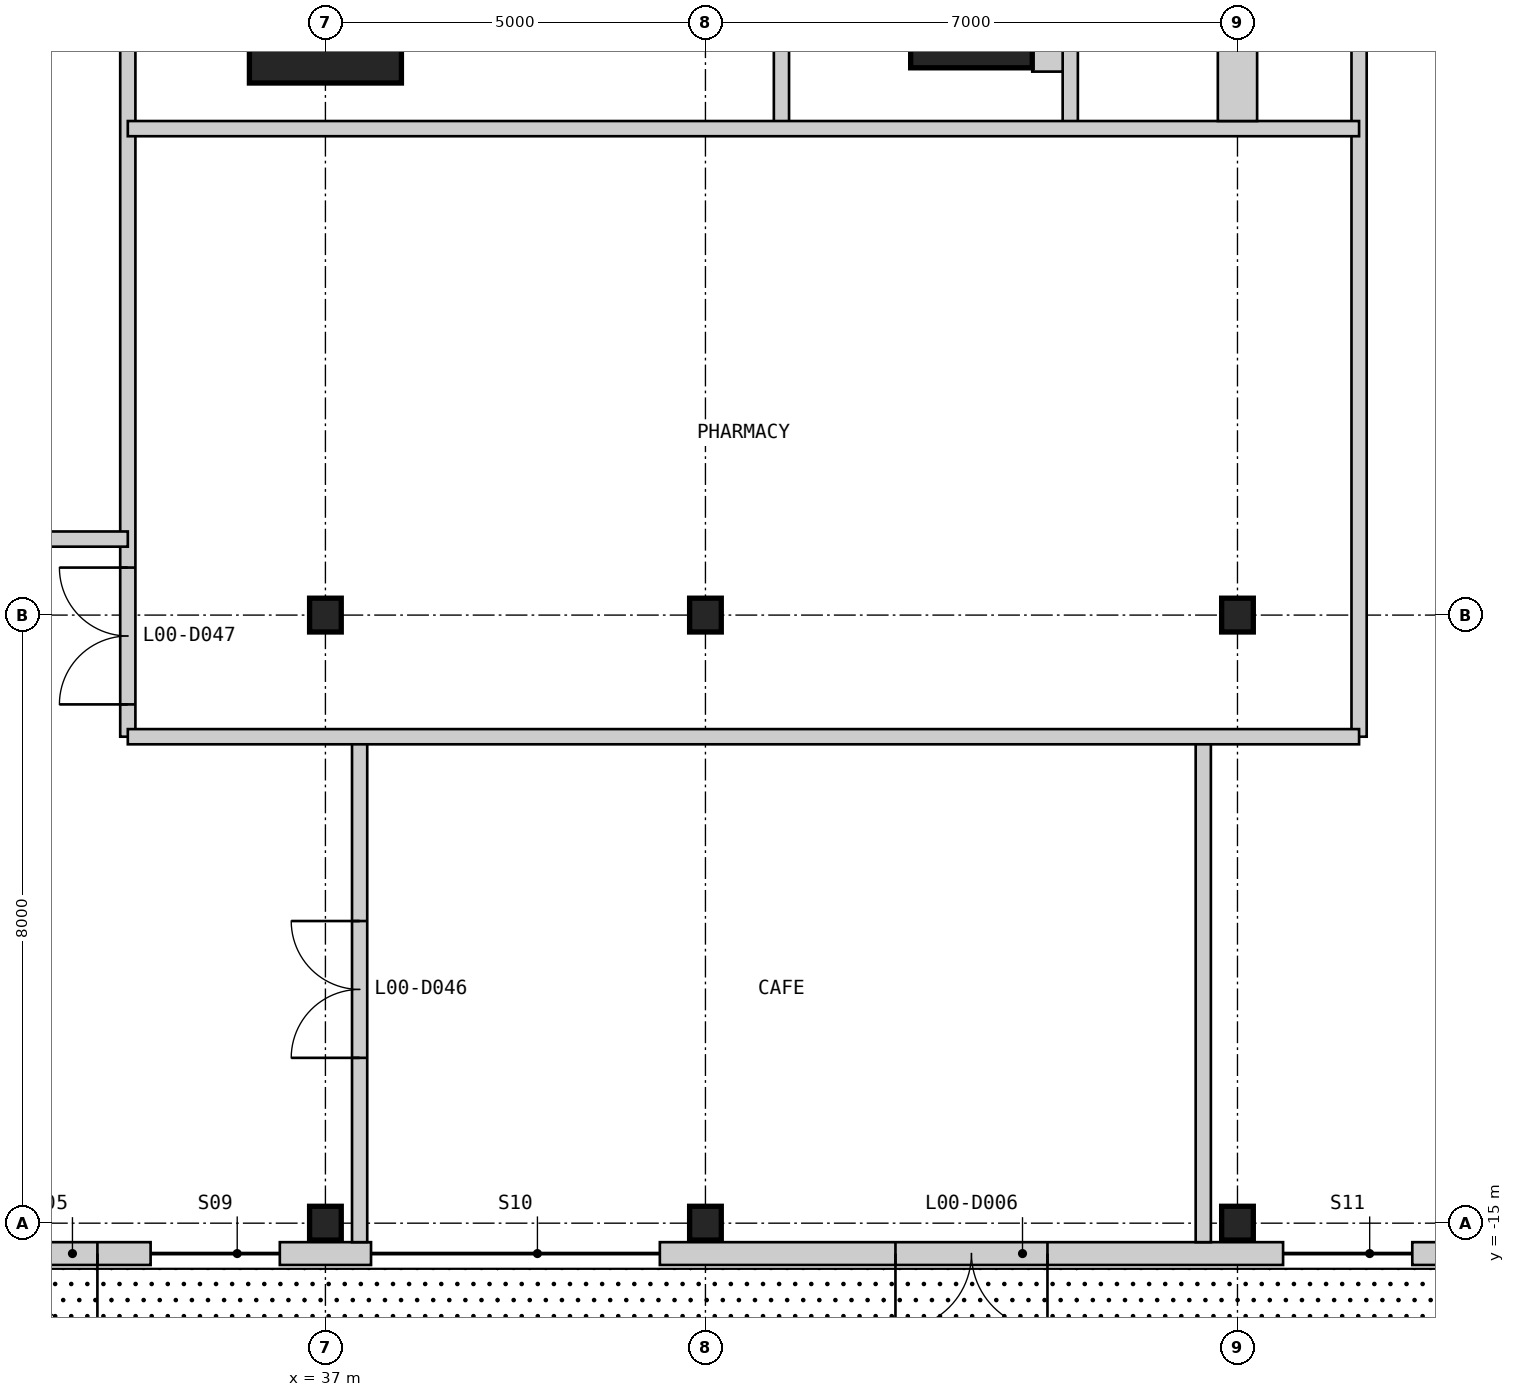
"""IFC4 building model, lengths in metres.
Left out: names, types, materials, properties, quantities, classifications, styles, units other than length and angle.
Written with IfcOpenShell. Run it as: python <this file> out.ifc"""

import sys

from ifc_helpers import new_model, si_unit, direction, frame, frame_2d, origin, origin_2d, place, context, subcontext, project, spatial, rectangle, i_section, extrude, element, fill, save


model = new_model("IFC4")
c1 = context("Model", 3, precision=1e-05, world=origin(), true_north=direction((0.0, 1.0)))
c2 = subcontext(c1, "Body", "Model", "MODEL_VIEW")
j1 = project(units=[si_unit("LENGTHUNIT", "METRE"), si_unit("PLANEANGLEUNIT", "RADIAN")], contexts=[c1])
p1 = place(None, origin())
s1 = spatial("IfcSite", under=j1, at=p1, CompositionType="ELEMENT")
p2 = place(p1, origin())
s2 = spatial("IfcBuilding", under=s1, at=p2, CompositionType="ELEMENT")
p3 = place(p2, origin())
s3 = spatial("IfcBuildingStorey", under=s2, at=p3, CompositionType="ELEMENT", Elevation=0.0)
p4 = place(p3, frame((37.0, 1.0, 0.0), z_axis=(0.0, 0.0, 1.0), x_axis=(1.0, 0.0, 0.0)))
e1 = element("IfcColumn", 1, at=p4, inside=s3, PredefinedType="COLUMN", context=c2, shape_type="SweptSolid", body=[
    extrude(rectangle(XDim=2.0, YDim=2.0, at=origin_2d()), origin(), (0.0, 0.0, 1.0), 7.0),
])
p5 = place(p3, frame((45.5, 1.0, 0.0), z_axis=(0.0, 0.0, 1.0), x_axis=(1.0, 0.0, 0.0)))
e2 = element("IfcColumn", 2, at=p5, inside=s3, PredefinedType="COLUMN", context=c2, shape_type="SweptSolid", body=[
    extrude(rectangle(XDim=1.6, YDim=1.6, at=origin_2d()), origin(), (0.0, 0.0, 1.0), 7.0),
])
p6 = place(p3, frame((37.0, -15.0, -0.3), z_axis=(0.0, 0.0, 1.0), x_axis=(1.0, 0.0, 0.0)))
e3 = element("IfcColumn", 3, at=p6, inside=s3, PredefinedType="COLUMN", context=c2, shape_type="SweptSolid", body=[
    extrude(i_section(OverallWidth=0.417, OverallDepth=0.445, WebThickness=0.039, FlangeThickness=0.063, at=origin_2d()), origin(), (0.0, 0.0, 1.0), 7.3),
])
p7 = place(p3, frame((37.0, -7.0, 0.0), z_axis=(0.0, 0.0, 1.0), x_axis=(1.0, 0.0, 0.0)))
e4 = element("IfcColumn", 4, at=p7, inside=s3, PredefinedType="COLUMN", context=c2, shape_type="SweptSolid", body=[
    extrude(i_section(OverallWidth=0.417, OverallDepth=0.445, WebThickness=0.039, FlangeThickness=0.063, at=origin_2d()), origin(), (0.0, 0.0, 1.0), 7.0),
])
p8 = place(p3, frame((42.0, -15.0, -0.3), z_axis=(0.0, 0.0, 1.0), x_axis=(1.0, 0.0, 0.0)))
e5 = element("IfcColumn", 5, at=p8, inside=s3, PredefinedType="COLUMN", context=c2, shape_type="SweptSolid", body=[
    extrude(i_section(OverallWidth=0.417, OverallDepth=0.445, WebThickness=0.039, FlangeThickness=0.063, at=origin_2d()), origin(), (0.0, 0.0, 1.0), 7.3),
])
p9 = place(p3, frame((42.0, -7.0, 0.0), z_axis=(0.0, 0.0, 1.0), x_axis=(1.0, 0.0, 0.0)))
e6 = element("IfcColumn", 6, at=p9, inside=s3, PredefinedType="COLUMN", context=c2, shape_type="SweptSolid", body=[
    extrude(i_section(OverallWidth=0.417, OverallDepth=0.445, WebThickness=0.039, FlangeThickness=0.063, at=origin_2d()), origin(), (0.0, 0.0, 1.0), 7.0),
])
p10 = place(p3, frame((49.0, -15.0, -0.3), z_axis=(0.0, 0.0, 1.0), x_axis=(1.0, 0.0, 0.0)))
e7 = element("IfcColumn", 7, at=p10, inside=s3, PredefinedType="COLUMN", context=c2, shape_type="SweptSolid", body=[
    extrude(i_section(OverallWidth=0.417, OverallDepth=0.445, WebThickness=0.039, FlangeThickness=0.063, at=origin_2d()), origin(), (0.0, 0.0, 1.0), 7.3),
])
p11 = place(p3, frame((49.0, -7.0, 0.0), z_axis=(0.0, 0.0, 1.0), x_axis=(1.0, 0.0, 0.0)))
e8 = element("IfcColumn", 8, at=p11, inside=s3, PredefinedType="COLUMN", context=c2, shape_type="SweptSolid", body=[
    extrude(i_section(OverallWidth=0.417, OverallDepth=0.445, WebThickness=0.039, FlangeThickness=0.063, at=origin_2d()), origin(), (0.0, 0.0, 1.0), 7.0),
])
p12 = place(p3, frame((27.3, -15.4, 0.0), z_axis=(0.0, 0.0, 1.0), x_axis=(1.0, 0.0, 0.0)))
e9 = element("IfcWall", 9, at=p12, inside=s3, PredefinedType="SOLIDWALL", context=c2, shape_type="SweptSolid", body=[
    extrude(rectangle(XDim=7.4, YDim=0.3, at=frame_2d((3.7, 0.0))), origin(), (0.0, 0.0, 1.0), 6.7),
])
p13 = place(p12, frame((0.7, 0.0, 0.0)))
e10 = element("IfcOpeningElement", 10, at=p13, cuts=e9, PredefinedType="OPENING", context=c2, shape_type="SweptSolid", body=[
    extrude(rectangle(XDim=2.0, YDim=3.0, at=frame_2d((1.0, 1.5))), frame((0.0, 0.16, 0.0), z_axis=(0.0, -1.0, 0.0), x_axis=(1.0, 0.0, 0.0)), (0.0, 0.0, 1.0), 0.32),
])
p14 = place(p12, frame((4.7, 0.0, 0.0)))
e11 = element("IfcOpeningElement", 11, at=p14, cuts=e9, PredefinedType="OPENING", context=c2, shape_type="SweptSolid", body=[
    extrude(rectangle(XDim=2.0, YDim=3.0, at=frame_2d((1.0, 1.5))), frame((0.0, 0.16, 0.0), z_axis=(0.0, -1.0, 0.0), x_axis=(1.0, 0.0, 0.0)), (0.0, 0.0, 1.0), 0.32),
])
p15 = place(p3, frame((36.4, -15.4, 0.0), z_axis=(0.0, 0.0, 1.0), x_axis=(1.0, 0.0, 0.0)))
e12 = element("IfcWall", 12, at=p15, inside=s3, PredefinedType="SOLIDWALL", context=c2, shape_type="SweptSolid", body=[
    extrude(rectangle(XDim=1.2, YDim=0.3, at=frame_2d((0.6, 0.0))), origin(), (0.0, 0.0, 1.0), 6.7),
])
p16 = place(p3, frame((41.4, -15.4, 0.0), z_axis=(0.0, 0.0, 1.0), x_axis=(1.0, 0.0, 0.0)))
e13 = element("IfcWall", 13, at=p16, inside=s3, PredefinedType="SOLIDWALL", context=c2, shape_type="SweptSolid", body=[
    extrude(rectangle(XDim=8.2, YDim=0.3, at=frame_2d((4.1, 0.0))), origin(), (0.0, 0.0, 1.0), 6.7),
])
p17 = place(p16, frame((3.1, 0.0, 0.0)))
e14 = element("IfcOpeningElement", 14, at=p17, cuts=e13, PredefinedType="OPENING", context=c2, shape_type="SweptSolid", body=[
    extrude(rectangle(XDim=2.0, YDim=3.0, at=frame_2d((1.0, 1.5))), frame((0.0, 0.16, 0.0), z_axis=(0.0, -1.0, 0.0), x_axis=(1.0, 0.0, 0.0)), (0.0, 0.0, 1.0), 0.32),
])
p18 = place(p3, frame((51.3, -15.4, 0.0), z_axis=(0.0, 0.0, 1.0), x_axis=(1.0, 0.0, 0.0)))
e15 = element("IfcWall", 15, at=p18, inside=s3, PredefinedType="SOLIDWALL", context=c2, shape_type="SweptSolid", body=[
    extrude(rectangle(XDim=3.4, YDim=0.3, at=frame_2d((1.7, 0.0))), origin(), (0.0, 0.0, 1.0), 6.7),
])
p19 = place(p18, frame((0.7, 0.0, 0.0)))
e16 = element("IfcOpeningElement", 16, at=p19, cuts=e15, PredefinedType="OPENING", context=c2, shape_type="SweptSolid", body=[
    extrude(rectangle(XDim=2.0, YDim=3.0, at=frame_2d((1.0, 1.5))), frame((0.0, 0.16, 0.0), z_axis=(0.0, -1.0, 0.0), x_axis=(1.0, 0.0, 0.0)), (0.0, 0.0, 1.0), 0.32),
])
p20 = place(p3, frame((34.4, -8.6, 0.0), z_axis=(0.0, 0.0, 1.0), x_axis=(0.0, 1.0, 0.0)))
e17 = element("IfcWall", 17, at=p20, inside=s3, PredefinedType="PARTITIONING", context=c2, shape_type="SweptSolid", body=[
    extrude(rectangle(XDim=15.6, YDim=0.2, at=frame_2d((7.8, 0.0))), origin(), (0.0, 0.0, 1.0), 6.7),
])
p21 = place(p20, frame((0.425, 0.0, 0.0)))
e18 = element("IfcOpeningElement", 18, at=p21, cuts=e17, PredefinedType="OPENING", context=c2, shape_type="SweptSolid", body=[
    extrude(rectangle(XDim=1.8, YDim=2.4, at=frame_2d((0.9, 1.2))), frame((0.0, 0.11, 0.0), z_axis=(0.0, -1.0, 0.0), x_axis=(1.0, 0.0, 0.0)), (0.0, 0.0, 1.0), 0.22),
])
p22 = place(p20, frame((13.175, 0.0, 0.0)))
e19 = element("IfcOpeningElement", 19, at=p22, cuts=e17, PredefinedType="OPENING", context=c2, shape_type="SweptSolid", body=[
    extrude(rectangle(XDim=1.8, YDim=2.4, at=frame_2d((0.9, 1.2))), frame((0.0, 0.11, 0.0), z_axis=(0.0, -1.0, 0.0), x_axis=(1.0, 0.0, 0.0)), (0.0, 0.0, 1.0), 0.22),
])
p23 = place(p3, frame((37.45, -15.25, 0.0), z_axis=(0.0, 0.0, 1.0), x_axis=(0.0, 1.0, 0.0)))
e20 = element("IfcWall", 20, at=p23, inside=s3, PredefinedType="PARTITIONING", context=c2, shape_type="SweptSolid", body=[
    extrude(rectangle(XDim=6.65, YDim=0.2, at=frame_2d((3.325, 0.0))), origin(), (0.0, 0.0, 1.0), 6.7),
])
p24 = place(p23, frame((2.425, 0.0, 0.0)))
e21 = element("IfcOpeningElement", 21, at=p24, cuts=e20, PredefinedType="OPENING", context=c2, shape_type="SweptSolid", body=[
    extrude(rectangle(XDim=1.8, YDim=2.4, at=frame_2d((0.9, 1.2))), frame((0.0, 0.11, 0.0), z_axis=(0.0, -1.0, 0.0), x_axis=(1.0, 0.0, 0.0)), (0.0, 0.0, 1.0), 0.22),
])
p25 = place(p3, frame((43.0, -0.6, 0.0), z_axis=(0.0, 0.0, 1.0), x_axis=(0.0, 1.0, 0.0)))
e22 = element("IfcWall", 22, at=p25, inside=s3, PredefinedType="PARTITIONING", context=c2, shape_type="SweptSolid", body=[
    extrude(rectangle(XDim=28.6, YDim=0.2, at=frame_2d((14.3, 0.0))), origin(), (0.0, 0.0, 1.0), 6.043),
])
p26 = place(p3, frame((46.8, -0.6, 0.0), z_axis=(0.0, 0.0, 1.0), x_axis=(0.0, 1.0, 0.0)))
e23 = element("IfcWall", 23, at=p26, inside=s3, PredefinedType="PARTITIONING", context=c2, shape_type="SweptSolid", body=[
    extrude(rectangle(XDim=16.2, YDim=0.2, at=frame_2d((8.1, 0.0))), origin(), (0.0, 0.0, 1.0), 6.7),
])
p27 = place(p3, frame((48.55, -15.25, 0.0), z_axis=(0.0, 0.0, 1.0), x_axis=(0.0, 1.0, 0.0)))
e24 = element("IfcWall", 24, at=p27, inside=s3, PredefinedType="PARTITIONING", context=c2, shape_type="SweptSolid", body=[
    extrude(rectangle(XDim=6.65, YDim=0.2, at=frame_2d((3.325, 0.0))), origin(), (0.0, 0.0, 1.0), 6.7),
])
p28 = place(p3, frame((50.6, -8.6, 0.0), z_axis=(0.0, 0.0, 1.0), x_axis=(0.0, 1.0, 0.0)))
e25 = element("IfcWall", 25, at=p28, inside=s3, PredefinedType="PARTITIONING", context=c2, shape_type="SweptSolid", body=[
    extrude(rectangle(XDim=24.2, YDim=0.2, at=frame_2d((12.1, 0.0))), origin(), (0.0, 0.0, 1.0), 6.7),
])
p29 = place(p3, frame((34.4, -8.6, 0.0), z_axis=(0.0, 0.0, 1.0), x_axis=(1.0, 0.0, 0.0)))
e26 = element("IfcWall", 26, at=p29, inside=s3, PredefinedType="PARTITIONING", context=c2, shape_type="SweptSolid", body=[
    extrude(rectangle(XDim=16.2, YDim=0.2, at=frame_2d((8.1, 0.0))), origin(), (0.0, 0.0, 1.0), 6.7),
])
p30 = place(p3, frame((26.4, -6.0, 0.0), z_axis=(0.0, 0.0, 1.0), x_axis=(1.0, 0.0, 0.0)))
e27 = element("IfcWall", 27, at=p30, inside=s3, PredefinedType="PARTITIONING", context=c2, shape_type="SweptSolid", body=[
    extrude(rectangle(XDim=8.0, YDim=0.2, at=frame_2d((4.0, 0.0))), origin(), (0.0, 0.0, 1.0), 6.7),
])
p31 = place(p3, frame((34.4, -0.6, 0.0), z_axis=(0.0, 0.0, 1.0), x_axis=(1.0, 0.0, 0.0)))
e28 = element("IfcWall", 28, at=p31, inside=s3, PredefinedType="PARTITIONING", context=c2, shape_type="SweptSolid", body=[
    extrude(rectangle(XDim=16.2, YDim=0.2, at=frame_2d((8.1, 0.0))), origin(), (0.0, 0.0, 1.0), 6.7),
])
p32 = place(p3, frame((46.7, 1.0, 0.0), z_axis=(0.0, 0.0, 1.0), x_axis=(-1.0, 0.0, 0.0)))
e29 = element("IfcWall", 29, at=p32, inside=s3, PredefinedType="PARTITIONING", context=c2, shape_type="SweptSolid", body=[
    extrude(rectangle(XDim=0.4, YDim=1.7, at=frame_2d((0.2, 0.0))), origin(), (0.0, 0.0, 1.0), 6.7),
])
p33 = place(p3, frame((49.0, -0.5, 0.0), z_axis=(0.0, 0.0, 1.0), x_axis=(0.0, 1.0, 0.0)))
e30 = element("IfcWall", 30, at=p33, inside=s3, PredefinedType="PARTITIONING", context=c2, shape_type="SweptSolid", body=[
    extrude(rectangle(XDim=1.278, YDim=0.517, at=frame_2d((0.639, 0.0))), origin(), (0.0, 0.0, 1.0), 5.954),
])
p34 = place(p14, frame((2.0, 0.0, 0.0), z_axis=(0.0, 0.0, 1.0), x_axis=(-1.0, 0.0, 0.0)))
e31 = element("IfcDoor", 31, at=p34, inside=s3, OperationType="DOUBLE_DOOR_SINGLE_SWING", PredefinedType="DOOR", context=c2, shape_type="SweptSolid", body=[
    extrude(rectangle(XDim=2.0, YDim=3.0, at=frame_2d((1.0, 1.5))), frame((0.0, 0.025, 0.0), z_axis=(0.0, -1.0, 0.0), x_axis=(1.0, 0.0, 0.0)), (0.0, 0.0, 1.0), 0.05),
])
fill(e11, e31)
p35 = place(p17, frame((2.0, 0.0, 0.0), z_axis=(0.0, 0.0, 1.0), x_axis=(-1.0, 0.0, 0.0)))
e32 = element("IfcDoor", 32, at=p35, inside=s3, OperationType="DOUBLE_DOOR_SINGLE_SWING", PredefinedType="DOOR", context=c2, shape_type="SweptSolid", body=[
    extrude(rectangle(XDim=2.0, YDim=3.0, at=frame_2d((1.0, 1.5))), frame((0.0, 0.025, 0.0), z_axis=(0.0, -1.0, 0.0), x_axis=(1.0, 0.0, 0.0)), (0.0, 0.0, 1.0), 0.05),
])
fill(e14, e32)
p36 = place(p24, origin())
e33 = element("IfcDoor", 33, at=p36, inside=s3, OperationType="DOUBLE_DOOR_SINGLE_SWING", PredefinedType="DOOR", context=c2, shape_type="SweptSolid", body=[
    extrude(rectangle(XDim=1.8, YDim=2.4, at=frame_2d((0.9, 1.2))), frame((0.0, 0.025, 0.0), z_axis=(0.0, -1.0, 0.0), x_axis=(1.0, 0.0, 0.0)), (0.0, 0.0, 1.0), 0.05),
])
fill(e21, e33)
p37 = place(p21, origin())
e34 = element("IfcDoor", 34, at=p37, inside=s3, OperationType="DOUBLE_DOOR_SINGLE_SWING", PredefinedType="DOOR", context=c2, shape_type="SweptSolid", body=[
    extrude(rectangle(XDim=1.8, YDim=2.4, at=frame_2d((0.9, 1.2))), frame((0.0, 0.025, 0.0), z_axis=(0.0, -1.0, 0.0), x_axis=(1.0, 0.0, 0.0)), (0.0, 0.0, 1.0), 0.05),
])
fill(e18, e34)
save(model, sys.argv[1])
